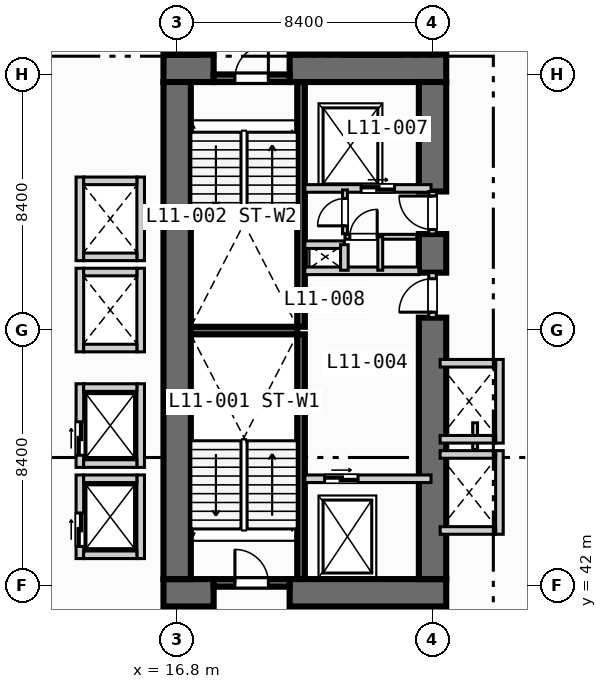
"""IFC4 building model, lengths in metres.
Left out: names, types, materials, properties, quantities, classifications, styles, units other than length and angle.
Written with IfcOpenShell. Run it as: python <this file> out.ifc"""

import sys

from ifc_helpers import new_model, si_unit, direction, frame, frame_2d, origin, place, context, subcontext, project, spatial, rectangle, extrude, element, fill, save


model = new_model("IFC4")
c1 = context("Model", 3, precision=1e-05, world=origin(), true_north=direction((0.0, 1.0)))
c2 = subcontext(c1, "Body", "Model", "MODEL_VIEW")
j1 = project(units=[si_unit("LENGTHUNIT", "METRE"), si_unit("PLANEANGLEUNIT", "RADIAN")], contexts=[c1])
p1 = place(None, origin())
s1 = spatial("IfcSite", under=j1, at=p1, CompositionType="ELEMENT")
p2 = place(p1, origin())
s2 = spatial("IfcBuilding", under=s1, at=p2, CompositionType="ELEMENT")
p3 = place(p2, frame((0.0, 0.0, 51.0)))
s3 = spatial("IfcBuildingStorey", under=s2, at=p3, CompositionType="ELEMENT", Elevation=51.0)
for number, where, z_axis, x_axis in (
    (1, (20.875, 42.2, 0.0), (0.0, 0.0, 1.0), (0.0, 1.0, 0.0)),
    (2, (20.875, 50.5, 0.0), (0.0, 0.0, 1.0), (0.0, 1.0, 0.0)),
):
    element("IfcWall", number, at=place(p3, frame(where, z_axis=z_axis, x_axis=x_axis)), inside=s3, PredefinedType="SOLIDWALL", context=c2, shape_type="SweptSolid", body=[
        extrude(rectangle(XDim=8.05, YDim=0.25, at=frame_2d((4.025, 0.0))), origin(), (0.0, 0.0, 1.0), 3.55),
    ])
p4 = place(p3, frame((17.25, 50.375, 0.0), z_axis=(0.0, 0.0, 1.0), x_axis=(1.0, 0.0, 0.0)))
e3 = element("IfcWall", 3, at=p4, inside=s3, PredefinedType="SOLIDWALL", context=c2, shape_type="SweptSolid", body=[
    extrude(rectangle(XDim=3.5, YDim=0.25, at=frame_2d((1.75, 0.0))), origin(), (0.0, 0.0, 1.0), 3.55),
])
p5 = place(p3, frame((16.35, 41.75, 0.0), z_axis=(0.0, 0.0, 1.0), x_axis=(1.0, 0.0, 0.0)))
e4 = element("IfcWall", 4, at=p5, inside=s3, PredefinedType="SHEAR", context=c2, shape_type="SweptSolid", body=[
    extrude(rectangle(XDim=1.65, YDim=0.9, at=frame_2d((0.825, 0.0))), origin(), (0.0, 0.0, 1.0), 3.55),
])
p6 = place(p3, frame((20.5, 41.75, 0.0), z_axis=(0.0, 0.0, 1.0), x_axis=(1.0, 0.0, 0.0)))
e5 = element("IfcWall", 5, at=p6, inside=s3, PredefinedType="SHEAR", context=c2, shape_type="SweptSolid", body=[
    extrude(rectangle(XDim=5.15, YDim=0.9, at=frame_2d((2.575, 0.0))), origin(), (0.0, 0.0, 1.0), 3.55),
])
p7 = place(p3, frame((16.35, 59.0, 0.0), z_axis=(0.0, 0.0, 1.0), x_axis=(1.0, 0.0, 0.0)))
e6 = element("IfcWall", 6, at=p7, inside=s3, PredefinedType="SHEAR", context=c2, shape_type="SweptSolid", body=[
    extrude(rectangle(XDim=1.65, YDim=0.9, at=frame_2d((0.825, 0.0))), origin(), (0.0, 0.0, 1.0), 3.55),
])
p8 = place(p3, frame((20.5, 59.0, 0.0), z_axis=(0.0, 0.0, 1.0), x_axis=(1.0, 0.0, 0.0)))
e7 = element("IfcWall", 7, at=p8, inside=s3, PredefinedType="SHEAR", context=c2, shape_type="SweptSolid", body=[
    extrude(rectangle(XDim=5.15, YDim=0.9, at=frame_2d((2.575, 0.0))), origin(), (0.0, 0.0, 1.0), 3.55),
])
p9 = place(p3, frame((16.8, 42.2, 0.0), z_axis=(0.0, 0.0, 1.0), x_axis=(0.0, 1.0, 0.0)))
e8 = element("IfcWall", 8, at=p9, inside=s3, PredefinedType="SHEAR", context=c2, shape_type="SweptSolid", body=[
    extrude(rectangle(XDim=16.35, YDim=0.9, at=frame_2d((8.175, 0.0))), origin(), (0.0, 0.0, 1.0), 3.55),
])
p10 = place(p3, frame((25.2, 42.2, 0.0), z_axis=(0.0, 0.0, 1.0), x_axis=(0.0, 1.0, 0.0)))
e9 = element("IfcWall", 9, at=p10, inside=s3, PredefinedType="SHEAR", context=c2, shape_type="SweptSolid", body=[
    extrude(rectangle(XDim=8.6, YDim=0.9, at=frame_2d((4.3, 0.0))), origin(), (0.0, 0.0, 1.0), 3.55),
])
p11 = place(p3, frame((25.2, 52.28, 0.0), z_axis=(0.0, 0.0, 1.0), x_axis=(0.0, 1.0, 0.0)))
e10 = element("IfcWall", 10, at=p11, inside=s3, PredefinedType="SHEAR", context=c2, shape_type="SweptSolid", body=[
    extrude(rectangle(XDim=1.27, YDim=0.9, at=frame_2d((0.635, 0.0))), origin(), (0.0, 0.0, 1.0), 3.55),
])
p12 = place(p3, frame((25.2, 54.95, 0.0), z_axis=(0.0, 0.0, 1.0), x_axis=(0.0, 1.0, 0.0)))
e11 = element("IfcWall", 11, at=p12, inside=s3, PredefinedType="SHEAR", context=c2, shape_type="SweptSolid", body=[
    extrude(rectangle(XDim=3.6, YDim=0.9, at=frame_2d((1.8, 0.0))), origin(), (0.0, 0.0, 1.0), 3.55),
])
p13 = place(p3, frame((18.0, 42.075, 0.0), z_axis=(0.0, 0.0, 1.0), x_axis=(1.0, 0.0, 0.0)))
e12 = element("IfcWall", 12, at=p13, inside=s3, PredefinedType="SOLIDWALL", context=c2, shape_type="SweptSolid", body=[
    extrude(rectangle(XDim=2.5, YDim=0.25, at=frame_2d((1.25, 0.0))), origin(), (0.0, 0.0, 1.0), 3.55),
])
p14 = place(p13, frame((0.7, 0.0, 0.0)))
e13 = element("IfcOpeningElement", 13, at=p14, cuts=e12, PredefinedType="OPENING", context=c2, shape_type="SweptSolid", body=[
    extrude(rectangle(XDim=1.1, YDim=2.15, at=frame_2d((0.55, 1.075))), frame((0.0, 0.135, 0.0), z_axis=(0.0, -1.0, 0.0), x_axis=(1.0, 0.0, 0.0)), (0.0, 0.0, 1.0), 0.27),
])
p15 = place(p3, frame((18.0, 58.675, 0.0), z_axis=(0.0, 0.0, 1.0), x_axis=(1.0, 0.0, 0.0)))
e14 = element("IfcWall", 14, at=p15, inside=s3, PredefinedType="SOLIDWALL", context=c2, shape_type="SweptSolid", body=[
    extrude(rectangle(XDim=2.5, YDim=0.25, at=frame_2d((1.25, 0.0))), origin(), (0.0, 0.0, 1.0), 3.55),
])
p16 = place(p15, frame((0.7, 0.0, 0.0)))
e15 = element("IfcOpeningElement", 15, at=p16, cuts=e14, PredefinedType="OPENING", context=c2, shape_type="SweptSolid", body=[
    extrude(rectangle(XDim=1.1, YDim=2.15, at=frame_2d((0.55, 1.075))), frame((0.0, 0.135, 0.0), z_axis=(0.0, -1.0, 0.0), x_axis=(1.0, 0.0, 0.0)), (0.0, 0.0, 1.0), 0.27),
])
p17 = place(p3, frame((21.0, 45.5, 0.0), z_axis=(0.0, 0.0, 1.0), x_axis=(1.0, 0.0, 0.0)))
e16 = element("IfcWall", 16, at=p17, inside=s3, PredefinedType="SOLIDWALL", context=c2, shape_type="SweptSolid", body=[
    extrude(rectangle(XDim=4.15, YDim=0.25, at=frame_2d((2.075, 0.0))), origin(), (0.0, 0.0, 1.0), 3.55),
])
p18 = place(p17, frame((0.65, 0.0, 0.0)))
e17 = element("IfcOpeningElement", 17, at=p18, cuts=e16, PredefinedType="OPENING", context=c2, shape_type="SweptSolid", body=[
    extrude(rectangle(XDim=1.1, YDim=2.15, at=frame_2d((0.55, 1.075))), frame((0.0, 0.135, 0.0), z_axis=(0.0, -1.0, 0.0), x_axis=(1.0, 0.0, 0.0)), (0.0, 0.0, 1.0), 0.27),
])
p19 = place(p3, frame((25.2, 50.8, 0.0), z_axis=(0.0, 0.0, 1.0), x_axis=(0.0, 1.0, 0.0)))
e18 = element("IfcWall", 18, at=p19, inside=s3, PredefinedType="SOLIDWALL", context=c2, shape_type="SweptSolid", body=[
    extrude(rectangle(XDim=1.48, YDim=0.25, at=frame_2d((0.74, 0.0))), origin(), (0.0, 0.0, 1.0), 3.55),
])
p20 = place(p19, frame((0.18, 0.0, 0.0)))
e19 = element("IfcOpeningElement", 19, at=p20, cuts=e18, PredefinedType="OPENING", context=c2, shape_type="SweptSolid", body=[
    extrude(rectangle(XDim=1.1, YDim=2.15, at=frame_2d((0.55, 1.075))), frame((0.0, 0.135, 0.0), z_axis=(0.0, -1.0, 0.0), x_axis=(1.0, 0.0, 0.0)), (0.0, 0.0, 1.0), 0.27),
])
p21 = place(p3, frame((21.0, 52.34, 0.0), z_axis=(0.0, 0.0, 1.0), x_axis=(1.0, 0.0, 0.0)))
e20 = element("IfcWall", 20, at=p21, inside=s3, PredefinedType="SOLIDWALL", context=c2, shape_type="SweptSolid", body=[
    extrude(rectangle(XDim=3.75, YDim=0.25, at=frame_2d((1.875, 0.0))), origin(), (0.0, 0.0, 1.0), 3.55),
])
p22 = place(p3, frame((21.0, 55.05, 0.0), z_axis=(0.0, 0.0, 1.0), x_axis=(1.0, 0.0, 0.0)))
e21 = element("IfcWall", 21, at=p22, inside=s3, PredefinedType="SOLIDWALL", context=c2, shape_type="SweptSolid", body=[
    extrude(rectangle(XDim=4.15, YDim=0.25, at=frame_2d((2.075, 0.0))), origin(), (0.0, 0.0, 1.0), 3.55),
])
p23 = place(p22, frame((1.85, 0.0, 0.0)))
e22 = element("IfcOpeningElement", 22, at=p23, cuts=e21, PredefinedType="OPENING", context=c2, shape_type="SweptSolid", body=[
    extrude(rectangle(XDim=1.1, YDim=2.15, at=frame_2d((0.55, 1.075))), frame((0.0, 0.135, 0.0), z_axis=(0.0, -1.0, 0.0), x_axis=(1.0, 0.0, 0.0)), (0.0, 0.0, 1.0), 0.27),
])
p24 = place(p3, frame((25.2, 53.55, 0.0), z_axis=(0.0, 0.0, 1.0), x_axis=(0.0, 1.0, 0.0)))
e23 = element("IfcWall", 23, at=p24, inside=s3, PredefinedType="SOLIDWALL", context=c2, shape_type="SweptSolid", body=[
    extrude(rectangle(XDim=1.4, YDim=0.25, at=frame_2d((0.7, 0.0))), origin(), (0.0, 0.0, 1.0), 3.55),
])
p25 = place(p24, frame((0.15, 0.0, 0.0)))
e24 = element("IfcOpeningElement", 24, at=p25, cuts=e23, PredefinedType="OPENING", context=c2, shape_type="SweptSolid", body=[
    extrude(rectangle(XDim=1.1, YDim=2.15, at=frame_2d((0.55, 1.075))), frame((0.0, 0.135, 0.0), z_axis=(0.0, -1.0, 0.0), x_axis=(1.0, 0.0, 0.0)), (0.0, 0.0, 1.0), 0.27),
])
p26 = place(p3, frame((21.0, 53.2, 0.0), z_axis=(0.0, 0.0, 1.0), x_axis=(1.0, 0.0, 0.0)))
e25 = element("IfcWall", 25, at=p26, inside=s3, PredefinedType="SOLIDWALL", context=c2, shape_type="SweptSolid", body=[
    extrude(rectangle(XDim=1.3, YDim=0.25, at=frame_2d((0.65, 0.0))), origin(), (0.0, 0.0, 1.0), 3.55),
])
p27 = place(p3, frame((22.3, 52.36, 0.0), z_axis=(0.0, 0.0, 1.0), x_axis=(0.0, 1.0, 0.0)))
e26 = element("IfcWall", 26, at=p27, inside=s3, PredefinedType="SOLIDWALL", context=c2, shape_type="SweptSolid", body=[
    extrude(rectangle(XDim=0.84, YDim=0.25, at=frame_2d((0.42, 0.0))), origin(), (0.0, 0.0, 1.0), 3.55),
])
p28 = place(p3, frame((22.32, 53.56, 0.0), z_axis=(0.0, 0.0, 1.0), x_axis=(0.0, 1.0, 0.0)))
e27 = element("IfcWall", 27, at=p28, inside=s3, PredefinedType="PARTITIONING", context=c2, shape_type="SweptSolid", body=[
    extrude(rectangle(XDim=1.44, YDim=0.16, at=frame_2d((0.72, 0.0))), origin(), (0.0, 0.0, 1.0), 3.55),
])
p29 = place(p28, frame((0.26, 0.0, 0.0)))
e28 = element("IfcOpeningElement", 28, at=p29, cuts=e27, PredefinedType="OPENING", context=c2, shape_type="SweptSolid", body=[
    extrude(rectangle(XDim=0.9, YDim=2.1, at=frame_2d((0.45, 1.05))), frame((0.0, 0.09, 0.0), z_axis=(0.0, -1.0, 0.0), x_axis=(1.0, 0.0, 0.0)), (0.0, 0.0, 1.0), 0.18),
])
p30 = place(p3, frame((22.32, 53.46, 0.0), z_axis=(0.0, 0.0, 1.0), x_axis=(1.0, 0.0, 0.0)))
e29 = element("IfcWall", 29, at=p30, inside=s3, PredefinedType="PARTITIONING", context=c2, shape_type="SweptSolid", body=[
    extrude(rectangle(XDim=2.36, YDim=0.16, at=frame_2d((1.18, 0.0))), origin(), (0.0, 0.0, 1.0), 3.55),
])
p31 = place(p30, frame((0.16, 0.0, 0.0)))
e30 = element("IfcOpeningElement", 30, at=p31, cuts=e29, PredefinedType="OPENING", context=c2, shape_type="SweptSolid", body=[
    extrude(rectangle(XDim=0.9, YDim=2.1, at=frame_2d((0.45, 1.05))), frame((0.0, 0.09, 0.0), z_axis=(0.0, -1.0, 0.0), x_axis=(1.0, 0.0, 0.0)), (0.0, 0.0, 1.0), 0.18),
])
p32 = place(p3, frame((23.48, 52.36, 0.0), z_axis=(0.0, 0.0, 1.0), x_axis=(0.0, 1.0, 0.0)))
e31 = element("IfcWall", 31, at=p32, inside=s3, PredefinedType="PARTITIONING", context=c2, shape_type="SweptSolid", body=[
    extrude(rectangle(XDim=1.1, YDim=0.16, at=frame_2d((0.55, 0.0))), origin(), (0.0, 0.0, 1.0), 3.55),
])
p33 = place(p3, frame((13.6, 42.875, 0.0), z_axis=(0.0, 0.0, 1.0), x_axis=(0.0, 1.0, 0.0)))
e32 = element("IfcWall", 32, at=p33, inside=s3, PredefinedType="SOLIDWALL", context=c2, shape_type="SweptSolid", body=[
    extrude(rectangle(XDim=2.75, YDim=0.25, at=frame_2d((1.375, 0.0))), origin(), (0.0, 0.0, 1.0), 3.55),
])
p34 = place(p33, frame((0.4, 0.0, 0.0)))
e33 = element("IfcOpeningElement", 33, at=p34, cuts=e32, PredefinedType="OPENING", context=c2, shape_type="SweptSolid", body=[
    extrude(rectangle(XDim=1.1, YDim=2.15, at=frame_2d((0.55, 1.075))), frame((0.0, 0.135, 0.0), z_axis=(0.0, -1.0, 0.0), x_axis=(1.0, 0.0, 0.0)), (0.0, 0.0, 1.0), 0.27),
])
p35 = place(p3, frame((15.6, 42.875, 0.0), z_axis=(0.0, 0.0, 1.0), x_axis=(0.0, 1.0, 0.0)))
e34 = element("IfcWall", 34, at=p35, inside=s3, PredefinedType="SOLIDWALL", context=c2, shape_type="SweptSolid", body=[
    extrude(rectangle(XDim=2.75, YDim=0.25, at=frame_2d((1.375, 0.0))), origin(), (0.0, 0.0, 1.0), 3.55),
])
for number, where, z_axis, x_axis in (
    (35, (13.725, 43.0, 0.0), (0.0, 0.0, 1.0), (1.0, 0.0, 0.0)),
    (36, (13.725, 45.5, 0.0), (0.0, 0.0, 1.0), (1.0, 0.0, 0.0)),
):
    element("IfcWall", number, at=place(p3, frame(where, z_axis=z_axis, x_axis=x_axis)), inside=s3, PredefinedType="SOLIDWALL", context=c2, shape_type="SweptSolid", body=[
        extrude(rectangle(XDim=1.75, YDim=0.25, at=frame_2d((0.875, 0.0))), origin(), (0.0, 0.0, 1.0), 3.55),
    ])
p36 = place(p3, frame((13.6, 45.875, 0.0), z_axis=(0.0, 0.0, 1.0), x_axis=(0.0, 1.0, 0.0)))
e37 = element("IfcWall", 37, at=p36, inside=s3, PredefinedType="SOLIDWALL", context=c2, shape_type="SweptSolid", body=[
    extrude(rectangle(XDim=2.75, YDim=0.25, at=frame_2d((1.375, 0.0))), origin(), (0.0, 0.0, 1.0), 3.55),
])
p37 = place(p36, frame((0.4, 0.0, 0.0)))
e38 = element("IfcOpeningElement", 38, at=p37, cuts=e37, PredefinedType="OPENING", context=c2, shape_type="SweptSolid", body=[
    extrude(rectangle(XDim=1.1, YDim=2.15, at=frame_2d((0.55, 1.075))), frame((0.0, 0.135, 0.0), z_axis=(0.0, -1.0, 0.0), x_axis=(1.0, 0.0, 0.0)), (0.0, 0.0, 1.0), 0.27),
])
p38 = place(p3, frame((15.6, 45.875, 0.0), z_axis=(0.0, 0.0, 1.0), x_axis=(0.0, 1.0, 0.0)))
e39 = element("IfcWall", 39, at=p38, inside=s3, PredefinedType="SOLIDWALL", context=c2, shape_type="SweptSolid", body=[
    extrude(rectangle(XDim=2.75, YDim=0.25, at=frame_2d((1.375, 0.0))), origin(), (0.0, 0.0, 1.0), 3.55),
])
for number, where, z_axis, x_axis in (
    (40, (13.725, 46.0, 0.0), (0.0, 0.0, 1.0), (1.0, 0.0, 0.0)),
    (41, (13.725, 48.5, 0.0), (0.0, 0.0, 1.0), (1.0, 0.0, 0.0)),
):
    element("IfcWall", number, at=place(p3, frame(where, z_axis=z_axis, x_axis=x_axis)), inside=s3, PredefinedType="SOLIDWALL", context=c2, shape_type="SweptSolid", body=[
        extrude(rectangle(XDim=1.75, YDim=0.25, at=frame_2d((0.875, 0.0))), origin(), (0.0, 0.0, 1.0), 3.55),
    ])
for number, where, z_axis, x_axis in (
    (42, (13.6, 49.675, 0.0), (0.0, 0.0, 1.0), (0.0, 1.0, 0.0)),
    (43, (15.6, 49.675, 0.0), (0.0, 0.0, 1.0), (0.0, 1.0, 0.0)),
):
    element("IfcWall", number, at=place(p3, frame(where, z_axis=z_axis, x_axis=x_axis)), inside=s3, PredefinedType="SOLIDWALL", context=c2, shape_type="SweptSolid", body=[
        extrude(rectangle(XDim=2.75, YDim=0.25, at=frame_2d((1.375, 0.0))), origin(), (0.0, 0.0, 1.0), 3.55),
    ])
for number, where, z_axis, x_axis in (
    (44, (13.725, 49.8, 0.0), (0.0, 0.0, 1.0), (1.0, 0.0, 0.0)),
    (45, (13.725, 52.3, 0.0), (0.0, 0.0, 1.0), (1.0, 0.0, 0.0)),
):
    element("IfcWall", number, at=place(p3, frame(where, z_axis=z_axis, x_axis=x_axis)), inside=s3, PredefinedType="SOLIDWALL", context=c2, shape_type="SweptSolid", body=[
        extrude(rectangle(XDim=1.75, YDim=0.25, at=frame_2d((0.875, 0.0))), origin(), (0.0, 0.0, 1.0), 3.55),
    ])
for number, where, z_axis, x_axis in (
    (46, (13.6, 52.675, 0.0), (0.0, 0.0, 1.0), (0.0, 1.0, 0.0)),
    (47, (15.6, 52.675, 0.0), (0.0, 0.0, 1.0), (0.0, 1.0, 0.0)),
):
    element("IfcWall", number, at=place(p3, frame(where, z_axis=z_axis, x_axis=x_axis)), inside=s3, PredefinedType="SOLIDWALL", context=c2, shape_type="SweptSolid", body=[
        extrude(rectangle(XDim=2.75, YDim=0.25, at=frame_2d((1.375, 0.0))), origin(), (0.0, 0.0, 1.0), 3.55),
    ])
for number, where, z_axis, x_axis in (
    (48, (13.725, 52.8, 0.0), (0.0, 0.0, 1.0), (1.0, 0.0, 0.0)),
    (49, (13.725, 55.3, 0.0), (0.0, 0.0, 1.0), (1.0, 0.0, 0.0)),
):
    element("IfcWall", number, at=place(p3, frame(where, z_axis=z_axis, x_axis=x_axis)), inside=s3, PredefinedType="SOLIDWALL", context=c2, shape_type="SweptSolid", body=[
        extrude(rectangle(XDim=1.75, YDim=0.25, at=frame_2d((0.875, 0.0))), origin(), (0.0, 0.0, 1.0), 3.55),
    ])
p39 = place(p3, frame((27.4, 43.675, 0.0), z_axis=(0.0, 0.0, 1.0), x_axis=(0.0, 1.0, 0.0)))
e50 = element("IfcWall", 50, at=p39, inside=s3, PredefinedType="SOLIDWALL", context=c2, shape_type="SweptSolid", body=[
    extrude(rectangle(XDim=2.75, YDim=0.25, at=frame_2d((1.375, 0.0))), origin(), (0.0, 0.0, 1.0), 3.55),
])
for number, where, z_axis, x_axis in (
    (51, (25.45, 43.8, 0.0), (0.0, 0.0, 1.0), (1.0, 0.0, 0.0)),
    (52, (25.45, 46.3, 0.0), (0.0, 0.0, 1.0), (1.0, 0.0, 0.0)),
):
    element("IfcWall", number, at=place(p3, frame(where, z_axis=z_axis, x_axis=x_axis)), inside=s3, PredefinedType="SOLIDWALL", context=c2, shape_type="SweptSolid", body=[
        extrude(rectangle(XDim=1.825, YDim=0.25, at=frame_2d((0.913, 0.0))), origin(), (0.0, 0.0, 1.0), 3.55),
    ])
p40 = place(p3, frame((26.6, 46.46, 0.0), z_axis=(0.0, 0.0, 1.0), x_axis=(0.0, 1.0, 0.0)))
e53 = element("IfcWall", 53, at=p40, inside=s3, PredefinedType="PARTITIONING", context=c2, shape_type="SweptSolid", body=[
    extrude(rectangle(XDim=0.88, YDim=0.16, at=frame_2d((0.44, 0.0))), origin(), (0.0, 0.0, 1.0), 3.55),
])
p41 = place(p3, frame((27.4, 46.675, 0.0), z_axis=(0.0, 0.0, 1.0), x_axis=(0.0, 1.0, 0.0)))
e54 = element("IfcWall", 54, at=p41, inside=s3, PredefinedType="SOLIDWALL", context=c2, shape_type="SweptSolid", body=[
    extrude(rectangle(XDim=2.75, YDim=0.25, at=frame_2d((1.375, 0.0))), origin(), (0.0, 0.0, 1.0), 3.55),
])
for number, where, z_axis, x_axis in (
    (55, (25.45, 46.8, 0.0), (0.0, 0.0, 1.0), (1.0, 0.0, 0.0)),
    (56, (25.45, 49.3, 0.0), (0.0, 0.0, 1.0), (1.0, 0.0, 0.0)),
):
    element("IfcWall", number, at=place(p3, frame(where, z_axis=z_axis, x_axis=x_axis)), inside=s3, PredefinedType="SOLIDWALL", context=c2, shape_type="SweptSolid", body=[
        extrude(rectangle(XDim=1.825, YDim=0.25, at=frame_2d((0.913, 0.0))), origin(), (0.0, 0.0, 1.0), 3.55),
    ])
p42 = place(p14, origin())
e57 = element("IfcDoor", 57, at=p42, inside=s3, OperationType="SINGLE_SWING_LEFT", PredefinedType="DOOR", context=c2, shape_type="SweptSolid", body=[
    extrude(rectangle(XDim=1.1, YDim=2.15, at=frame_2d((0.55, 1.075))), frame((0.0, 0.025, 0.0), z_axis=(0.0, -1.0, 0.0), x_axis=(1.0, 0.0, 0.0)), (0.0, 0.0, 1.0), 0.05),
])
fill(e13, e57)
p43 = place(p16, origin())
e58 = element("IfcDoor", 58, at=p43, inside=s3, OperationType="SINGLE_SWING_RIGHT", PredefinedType="DOOR", context=c2, shape_type="SweptSolid", body=[
    extrude(rectangle(XDim=1.1, YDim=2.15, at=frame_2d((0.55, 1.075))), frame((0.0, 0.025, 0.0), z_axis=(0.0, -1.0, 0.0), x_axis=(1.0, 0.0, 0.0)), (0.0, 0.0, 1.0), 0.05),
])
fill(e15, e58)
p44 = place(p18, origin())
e59 = element("IfcDoor", 59, at=p44, inside=s3, OperationType="SLIDING_TO_LEFT", PredefinedType="DOOR", context=c2, shape_type="SweptSolid", body=[
    extrude(rectangle(XDim=1.1, YDim=2.15, at=frame_2d((0.55, 1.075))), frame((0.0, 0.025, 0.0), z_axis=(0.0, -1.0, 0.0), x_axis=(1.0, 0.0, 0.0)), (0.0, 0.0, 1.0), 0.05),
])
fill(e17, e59)
p45 = place(p20, origin())
e60 = element("IfcDoor", 60, at=p45, inside=s3, OperationType="SINGLE_SWING_LEFT", PredefinedType="DOOR", context=c2, shape_type="SweptSolid", body=[
    extrude(rectangle(XDim=1.1, YDim=2.15, at=frame_2d((0.55, 1.075))), frame((0.0, 0.025, 0.0), z_axis=(0.0, -1.0, 0.0), x_axis=(1.0, 0.0, 0.0)), (0.0, 0.0, 1.0), 0.05),
])
fill(e19, e60)
p46 = place(p23, origin())
e61 = element("IfcDoor", 61, at=p46, inside=s3, OperationType="SLIDING_TO_LEFT", PredefinedType="DOOR", context=c2, shape_type="SweptSolid", body=[
    extrude(rectangle(XDim=1.1, YDim=2.15, at=frame_2d((0.55, 1.075))), frame((0.0, 0.025, 0.0), z_axis=(0.0, -1.0, 0.0), x_axis=(1.0, 0.0, 0.0)), (0.0, 0.0, 1.0), 0.05),
])
fill(e22, e61)
p47 = place(p25, origin())
e62 = element("IfcDoor", 62, at=p47, inside=s3, OperationType="SINGLE_SWING_RIGHT", PredefinedType="DOOR", context=c2, shape_type="SweptSolid", body=[
    extrude(rectangle(XDim=1.1, YDim=2.15, at=frame_2d((0.55, 1.075))), frame((0.0, 0.025, 0.0), z_axis=(0.0, -1.0, 0.0), x_axis=(1.0, 0.0, 0.0)), (0.0, 0.0, 1.0), 0.05),
])
fill(e24, e62)
p48 = place(p29, origin())
e63 = element("IfcDoor", 63, at=p48, inside=s3, OperationType="SINGLE_SWING_LEFT", PredefinedType="DOOR", context=c2, shape_type="SweptSolid", body=[
    extrude(rectangle(XDim=0.9, YDim=2.1, at=frame_2d((0.45, 1.05))), frame((0.0, 0.025, 0.0), z_axis=(0.0, -1.0, 0.0), x_axis=(1.0, 0.0, 0.0)), (0.0, 0.0, 1.0), 0.05),
])
fill(e28, e63)
p49 = place(p31, origin())
e64 = element("IfcDoor", 64, at=p49, inside=s3, OperationType="SINGLE_SWING_RIGHT", PredefinedType="DOOR", context=c2, shape_type="SweptSolid", body=[
    extrude(rectangle(XDim=0.9, YDim=2.1, at=frame_2d((0.45, 1.05))), frame((0.0, 0.025, 0.0), z_axis=(0.0, -1.0, 0.0), x_axis=(1.0, 0.0, 0.0)), (0.0, 0.0, 1.0), 0.05),
])
fill(e30, e64)
p50 = place(p34, origin())
e65 = element("IfcDoor", 65, at=p50, inside=s3, OperationType="SLIDING_TO_LEFT", PredefinedType="DOOR", context=c2, shape_type="SweptSolid", body=[
    extrude(rectangle(XDim=1.1, YDim=2.15, at=frame_2d((0.55, 1.075))), frame((0.0, 0.025, 0.0), z_axis=(0.0, -1.0, 0.0), x_axis=(1.0, 0.0, 0.0)), (0.0, 0.0, 1.0), 0.05),
])
fill(e33, e65)
p51 = place(p37, origin())
e66 = element("IfcDoor", 66, at=p51, inside=s3, OperationType="SLIDING_TO_LEFT", PredefinedType="DOOR", context=c2, shape_type="SweptSolid", body=[
    extrude(rectangle(XDim=1.1, YDim=2.15, at=frame_2d((0.55, 1.075))), frame((0.0, 0.025, 0.0), z_axis=(0.0, -1.0, 0.0), x_axis=(1.0, 0.0, 0.0)), (0.0, 0.0, 1.0), 0.05),
])
fill(e38, e66)
save(model, sys.argv[1])
